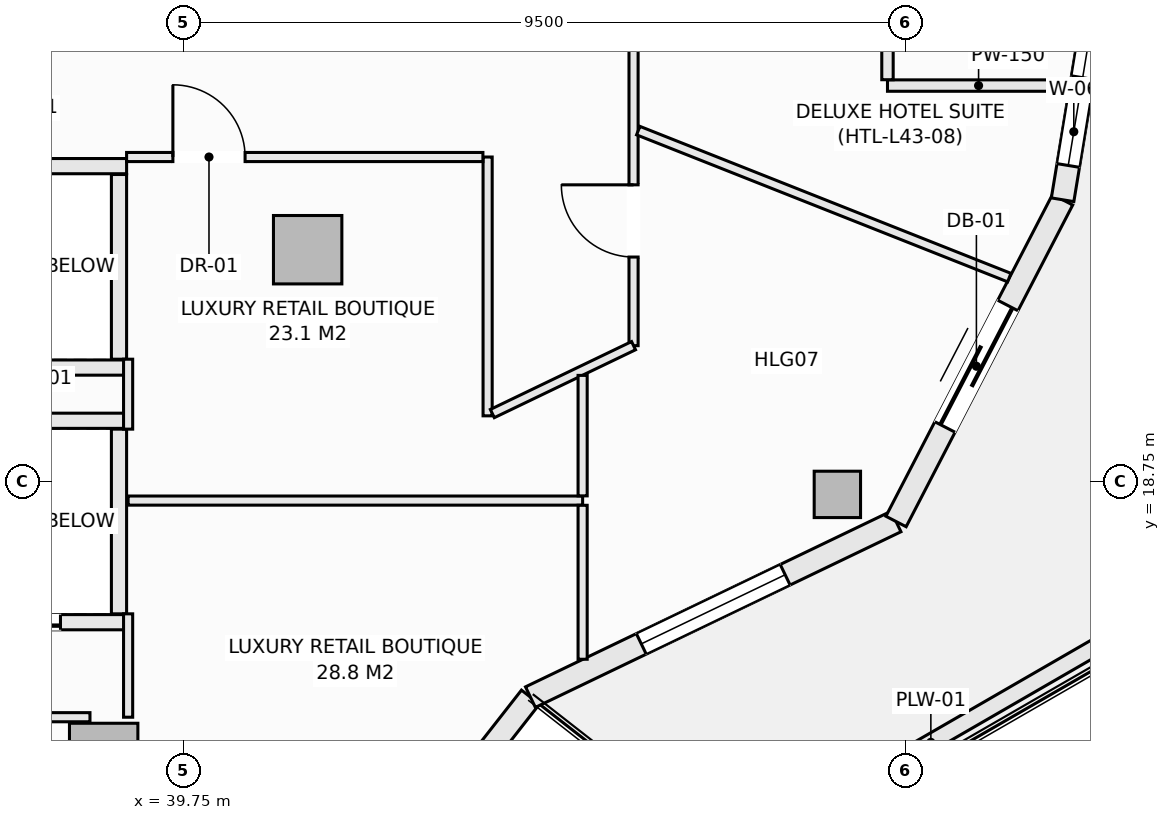
"""IFC4 building model, lengths in metres.
Left out: names, types, materials, properties, quantities, classifications, styles, units other than length and angle.
Written with IfcOpenShell. Run it as: python <this file> out.ifc"""

import sys

from ifc_helpers import new_model, si_unit, direction, frame, frame_2d, origin, origin_2d, place, context, subcontext, project, spatial, rectangle, hollow_rectangle, extrude, element, fill, save


model = new_model("IFC4")
c1 = context("Model", 3, precision=1e-05, world=origin(), true_north=direction((0.0, 1.0)))
c2 = subcontext(c1, "Body", "Model", "MODEL_VIEW")
j1 = project(units=[si_unit("LENGTHUNIT", "METRE"), si_unit("PLANEANGLEUNIT", "RADIAN")], contexts=[c1])
p1 = place(None, origin())
s1 = spatial("IfcSite", under=j1, at=p1, CompositionType="ELEMENT")
p2 = place(p1, origin())
s2 = spatial("IfcBuilding", under=s1, at=p2, CompositionType="ELEMENT")
p3 = place(p2, frame((0.0, 0.0, 166.5)))
s3 = spatial("IfcBuildingStorey", under=s2, at=p3, CompositionType="ELEMENT", Elevation=166.5)
p4 = place(p3, frame((48.352, 18.581, -0.27), z_axis=(0.0, 0.0, 1.0), x_axis=(1.0, 0.0, 0.0)))
e1 = element("IfcColumn", 1, at=p4, inside=s3, PredefinedType="COLUMN", context=c2, shape_type="SweptSolid", body=[
    extrude(hollow_rectangle(XDim=0.61, YDim=0.61, WallThickness=0.025, at=origin_2d()), origin(), (0.0, 0.0, 1.0), 3.4),
])
for number, where, z_axis, x_axis in (
    (2, (38.698, 15.121, -0.27), (0.0, 0.0, 1.0), (1.0, 0.0, 0.0)),
    (3, (41.382, 21.801, -0.27), (0.0, 0.0, 1.0), (1.0, 0.0, 0.0)),
):
    element("IfcColumn", number, at=place(p3, frame(where, z_axis=z_axis, x_axis=x_axis)), inside=s3, PredefinedType="COLUMN", context=c2, shape_type="SweptSolid", body=[
        extrude(rectangle(XDim=0.9, YDim=0.9, at=origin_2d()), origin(), (0.0, 0.0, 1.0), 3.4),
    ])
p5 = place(p3, frame((41.094, 11.801, 0.0), z_axis=(0.0, 0.0, 1.0), x_axis=(0.616429245738, 0.787410302828, 0.0)))
e4 = element("IfcWall", 4, at=p5, inside=s3, PredefinedType="SOLIDWALL", context=c2, shape_type="SweptSolid", body=[
    extrude(rectangle(XDim=5.223, YDim=0.3, at=frame_2d((2.612, 0.0))), origin(), (0.0, 0.0, 1.0), 2.653),
])
p6 = place(p5, frame((1.38, 0.0, 0.72)))
e5 = element("IfcOpeningElement", 5, at=p6, cuts=e4, PredefinedType="OPENING", context=c2, shape_type="SweptSolid", body=[
    extrude(rectangle(XDim=1.2, YDim=1.65, at=frame_2d((0.6, 0.825))), frame((0.0, 0.16, 0.0), z_axis=(0.0, -1.0, 0.0), x_axis=(1.0, 0.0, 0.0)), (0.0, 0.0, 1.0), 0.32),
])
p7 = place(p3, frame((44.313, 15.914, 0.0), z_axis=(0.0, 0.0, 1.0), x_axis=(0.901353070301, 0.433085029363, 0.0)))
e6 = element("IfcWall", 6, at=p7, inside=s3, PredefinedType="SOLIDWALL", context=c2, shape_type="SweptSolid", body=[
    extrude(rectangle(XDim=5.336, YDim=0.3, at=frame_2d((2.668, 0.0))), origin(), (0.0, 0.0, 1.0), 2.653),
])
p8 = place(p7, frame((1.618, 0.0, 0.74)))
e7 = element("IfcOpeningElement", 7, at=p8, cuts=e6, PredefinedType="OPENING", context=c2, shape_type="SweptSolid", body=[
    extrude(rectangle(XDim=2.1, YDim=1.7, at=frame_2d((1.05, 0.85))), frame((0.0, 0.16, 0.0), z_axis=(0.0, -1.0, 0.0), x_axis=(1.0, 0.0, 0.0)), (0.0, 0.0, 1.0), 0.32),
])
p9 = place(p3, frame((49.123, 18.225, 0.0), z_axis=(0.0, 0.0, 1.0), x_axis=(0.459810251451, 0.888017191647, 0.0)))
e8 = element("IfcWall", 8, at=p9, inside=s3, PredefinedType="SOLIDWALL", context=c2, shape_type="SweptSolid", body=[
    extrude(rectangle(XDim=4.766, YDim=0.3, at=frame_2d((2.383, 0.0))), origin(), (0.0, 0.0, 1.0), 2.653),
])
p10 = place(p9, frame((1.4, 0.0, 0.0)))
e9 = element("IfcOpeningElement", 9, at=p10, cuts=e8, PredefinedType="OPENING", context=c2, shape_type="SweptSolid", body=[
    extrude(rectangle(XDim=1.8, YDim=2.25, at=frame_2d((0.9, 1.125))), frame((0.0, 0.16, 0.0), z_axis=(0.0, -1.0, 0.0), x_axis=(1.0, 0.0, 0.0)), (0.0, 0.0, 1.0), 0.32),
])
p11 = place(p3, frame((51.315, 22.458, 0.0), z_axis=(0.0, 0.0, 1.0), x_axis=(0.162394765401, 0.986725868806, 0.0)))
e10 = element("IfcWall", 10, at=p11, inside=s3, PredefinedType="SOLIDWALL", context=c2, shape_type="SweptSolid", body=[
    extrude(rectangle(XDim=4.603, YDim=0.3, at=frame_2d((2.302, 0.0))), origin(), (0.0, 0.0, 1.0), 2.653),
])
p12 = place(p11, frame((0.457, 0.0, 0.72)))
e11 = element("IfcOpeningElement", 11, at=p12, cuts=e10, PredefinedType="OPENING", context=c2, shape_type="SweptSolid", body=[
    extrude(rectangle(XDim=0.9, YDim=1.65, at=frame_2d((0.45, 0.825))), frame((0.0, 0.16, 0.0), z_axis=(0.0, -1.0, 0.0), x_axis=(1.0, 0.0, 0.0)), (0.0, 0.0, 1.0), 0.32),
])
p13 = place(p11, frame((1.627, 0.0, 0.72)))
e12 = element("IfcOpeningElement", 12, at=p13, cuts=e10, PredefinedType="OPENING", context=c2, shape_type="SweptSolid", body=[
    extrude(rectangle(XDim=0.9, YDim=1.65, at=frame_2d((0.45, 0.825))), frame((0.0, 0.16, 0.0), z_axis=(0.0, -1.0, 0.0), x_axis=(1.0, 0.0, 0.0)), (0.0, 0.0, 1.0), 0.32),
])
p14 = place(p3, frame((46.958, 13.805, 0.0), z_axis=(0.0, 0.0, 1.0), x_axis=(0.866058128659, 0.499943314571, 0.0)))
e13 = element("IfcWall", 13, at=p14, inside=s3, PredefinedType="PARAPET", context=c2, shape_type="SweptSolid", body=[
    extrude(rectangle(XDim=6.06, YDim=0.22, at=frame_2d((3.03, 0.0))), origin(), (0.0, 0.0, 1.0), 0.52),
])
p15 = place(p3, frame((36.75, 19.55, 0.0), z_axis=(0.0, 0.0, 1.0), x_axis=(1.0, 0.0, 0.0)))
e14 = element("IfcWall", 14, at=p15, inside=s3, PredefinedType="SOLIDWALL", context=c2, shape_type="SweptSolid", body=[
    extrude(rectangle(XDim=2.25, YDim=0.2, at=frame_2d((1.125, 0.0))), origin(), (0.0, 0.0, 1.0), 3.13),
])
p16 = place(p3, frame((36.75, 16.9, 0.0), z_axis=(0.0, 0.0, 1.0), x_axis=(1.0, 0.0, 0.0)))
e15 = element("IfcWall", 15, at=p16, inside=s3, PredefinedType="SOLIDWALL", context=c2, shape_type="SweptSolid", body=[
    extrude(rectangle(XDim=2.25, YDim=0.2, at=frame_2d((1.125, 0.0))), origin(), (0.0, 0.0, 1.0), 3.13),
])
p17 = place(p16, frame((0.28, 0.0, 0.0)))
e16 = element("IfcOpeningElement", 16, at=p17, cuts=e15, PredefinedType="OPENING", context=c2, shape_type="SweptSolid", body=[
    extrude(rectangle(XDim=1.1, YDim=2.2, at=frame_2d((0.55, 1.1))), frame((0.0, 0.11, 0.0), z_axis=(0.0, -1.0, 0.0), x_axis=(1.0, 0.0, 0.0)), (0.0, 0.0, 1.0), 0.22),
])
p18 = place(p3, frame((38.9, 17.01, 0.0), z_axis=(0.0, 0.0, 1.0), x_axis=(0.0, 1.0, 0.0)))
e17 = element("IfcWall", 17, at=p18, inside=s3, PredefinedType="SOLIDWALL", context=c2, shape_type="SweptSolid", body=[
    extrude(rectangle(XDim=2.43, YDim=0.2, at=frame_2d((1.215, 0.0))), origin(), (0.0, 0.0, 1.0), 3.13),
])
for number, where, z_axis, x_axis in (
    (18, (36.75, 22.9, 0.0), (0.0, 0.0, 1.0), (1.0, 0.0, 0.0)),
    (19, (36.75, 20.25, 0.0), (0.0, 0.0, 1.0), (1.0, 0.0, 0.0)),
):
    element("IfcWall", number, at=place(p3, frame(where, z_axis=z_axis, x_axis=x_axis)), inside=s3, PredefinedType="SOLIDWALL", context=c2, shape_type="SweptSolid", body=[
        extrude(rectangle(XDim=2.25, YDim=0.2, at=frame_2d((1.125, 0.0))), origin(), (0.0, 0.0, 1.0), 3.13),
    ])
p19 = place(p3, frame((38.9, 20.36, 0.0), z_axis=(0.0, 0.0, 1.0), x_axis=(0.0, 1.0, 0.0)))
e20 = element("IfcWall", 20, at=p19, inside=s3, PredefinedType="SOLIDWALL", context=c2, shape_type="SweptSolid", body=[
    extrude(rectangle(XDim=2.43, YDim=0.2, at=frame_2d((1.215, 0.0))), origin(), (0.0, 0.0, 1.0), 3.13),
])
p20 = place(p3, frame((49.011, 23.96, 0.0), z_axis=(0.0, 0.0, 1.0), x_axis=(1.0, 0.0, 0.0)))
e21 = element("IfcWall", 21, at=p20, inside=s3, PredefinedType="PARTITIONING", context=c2, shape_type="SweptSolid", body=[
    extrude(rectangle(XDim=2.397, YDim=0.15, at=frame_2d((1.199, 0.0))), origin(), (0.0, 0.0, 1.0), 3.13),
])
p21 = place(p3, frame((39.02, 15.65, 0.0), z_axis=(0.0, 0.0, 1.0), x_axis=(0.0, 1.0, 0.0)))
e22 = element("IfcWall", 22, at=p21, inside=s3, PredefinedType="PARTITIONING", context=c2, shape_type="SweptSolid", body=[
    extrude(rectangle(XDim=1.36, YDim=0.12, at=frame_2d((0.68, 0.0))), origin(), (0.0, 0.0, 1.0), 2.505),
])
p22 = place(p3, frame((39.02, 19.44, 0.0), z_axis=(0.0, 0.0, 1.0), x_axis=(0.0, 1.0, 0.0)))
e23 = element("IfcWall", 23, at=p22, inside=s3, PredefinedType="PARTITIONING", context=c2, shape_type="SweptSolid", body=[
    extrude(rectangle(XDim=0.92, YDim=0.12, at=frame_2d((0.46, 0.0))), origin(), (0.0, 0.0, 1.0), 3.13),
])
p23 = place(p3, frame((35.95, 15.65, 0.0), z_axis=(0.0, 0.0, 1.0), x_axis=(1.0, 0.0, 0.0)))
e24 = element("IfcWall", 24, at=p23, inside=s3, PredefinedType="PARTITIONING", context=c2, shape_type="SweptSolid", body=[
    extrude(rectangle(XDim=2.568, YDim=0.12, at=frame_2d((1.284, 0.0))), origin(), (0.0, 0.0, 1.0), 3.13),
])
p24 = place(p23, frame((0.809, 0.0, 0.0)))
e25 = element("IfcOpeningElement", 25, at=p24, cuts=e24, PredefinedType="OPENING", context=c2, shape_type="SweptSolid", body=[
    extrude(rectangle(XDim=0.95, YDim=2.1, at=frame_2d((0.475, 1.05))), frame((0.0, 0.07, 0.0), z_axis=(0.0, -1.0, 0.0), x_axis=(1.0, 0.0, 0.0)), (0.0, 0.0, 1.0), 0.14),
])
p25 = place(p3, frame((43.75, 19.615, 0.0), z_axis=(0.0, 0.0, 1.0), x_axis=(0.0, 1.0, 0.0)))
e26 = element("IfcWall", 26, at=p25, inside=s3, PredefinedType="PARTITIONING", context=c2, shape_type="SweptSolid", body=[
    extrude(rectangle(XDim=3.405, YDim=0.12, at=frame_2d((1.703, 0.0))), origin(), (0.0, 0.0, 1.0), 3.13),
])
p26 = place(p3, frame((45.67, 20.538, 0.0), z_axis=(0.0, 0.0, 1.0), x_axis=(0.0, 1.0, 0.0)))
e27 = element("IfcWall", 27, at=p26, inside=s3, PredefinedType="PARTITIONING", context=c2, shape_type="SweptSolid", body=[
    extrude(rectangle(XDim=12.924, YDim=0.12, at=frame_2d((6.462, 0.0))), origin(), (0.0, 0.0, 1.0), 3.13),
])
p27 = place(p26, frame((1.166, 0.0, 0.0)))
e28 = element("IfcOpeningElement", 28, at=p27, cuts=e27, PredefinedType="OPENING", context=c2, shape_type="SweptSolid", body=[
    extrude(rectangle(XDim=0.95, YDim=2.1, at=frame_2d((0.475, 1.05))), frame((0.0, 0.07, 0.0), z_axis=(0.0, -1.0, 0.0), x_axis=(1.0, 0.0, 0.0)), (0.0, 0.0, 1.0), 0.14),
])
p28 = place(p26, frame((4.174, 0.0, 0.0)))
e29 = element("IfcOpeningElement", 29, at=p28, cuts=e27, PredefinedType="OPENING", context=c2, shape_type="SweptSolid", body=[
    extrude(rectangle(XDim=0.95, YDim=2.1, at=frame_2d((0.475, 1.05))), frame((0.0, 0.07, 0.0), z_axis=(0.0, -1.0, 0.0), x_axis=(1.0, 0.0, 0.0)), (0.0, 0.0, 1.0), 0.14),
])
p29 = place(p26, frame((7.8, 0.0, 0.0)))
e30 = element("IfcOpeningElement", 30, at=p29, cuts=e27, PredefinedType="OPENING", context=c2, shape_type="SweptSolid", body=[
    extrude(rectangle(XDim=0.95, YDim=2.1, at=frame_2d((0.475, 1.05))), frame((0.0, 0.07, 0.0), z_axis=(0.0, -1.0, 0.0), x_axis=(1.0, 0.0, 0.0)), (0.0, 0.0, 1.0), 0.14),
])
p30 = place(p26, frame((10.808, 0.0, 0.0)))
e31 = element("IfcOpeningElement", 31, at=p30, cuts=e27, PredefinedType="OPENING", context=c2, shape_type="SweptSolid", body=[
    extrude(rectangle(XDim=0.95, YDim=2.1, at=frame_2d((0.475, 1.05))), frame((0.0, 0.07, 0.0), z_axis=(0.0, -1.0, 0.0), x_axis=(1.0, 0.0, 0.0)), (0.0, 0.0, 1.0), 0.14),
])
p31 = place(p3, frame((43.812, 19.645, 0.0), z_axis=(0.0, 0.0, 1.0), x_axis=(0.901236415331, 0.433327732417, 0.0)))
e32 = element("IfcWall", 32, at=p31, inside=s3, PredefinedType="PARTITIONING", context=c2, shape_type="SweptSolid", body=[
    extrude(rectangle(XDim=2.062, YDim=0.12, at=frame_2d((1.031, 0.0))), origin(), (0.0, 0.0, 1.0), 3.13),
])
p32 = place(p3, frame((39.0, 23.02, 0.0), z_axis=(0.0, 0.0, 1.0), x_axis=(1.0, 0.0, 0.0)))
e33 = element("IfcWall", 33, at=p32, inside=s3, PredefinedType="PARTITIONING", context=c2, shape_type="SweptSolid", body=[
    extrude(rectangle(XDim=4.688, YDim=0.12, at=frame_2d((2.344, 0.0))), origin(), (0.0, 0.0, 1.0), 3.13),
])
p33 = place(p32, frame((0.609, 0.0, 0.0)))
e34 = element("IfcOpeningElement", 34, at=p33, cuts=e33, PredefinedType="OPENING", context=c2, shape_type="SweptSolid", body=[
    extrude(rectangle(XDim=0.95, YDim=2.1, at=frame_2d((0.475, 1.05))), frame((0.0, 0.07, 0.0), z_axis=(0.0, -1.0, 0.0), x_axis=(1.0, 0.0, 0.0)), (0.0, 0.0, 1.0), 0.14),
])
p34 = place(p3, frame((39.02, 18.5, 0.0), z_axis=(0.0, 0.0, 1.0), x_axis=(1.0, 0.0, 0.0)))
e35 = element("IfcWall", 35, at=p34, inside=s3, PredefinedType="PARTITIONING", context=c2, shape_type="SweptSolid", body=[
    extrude(rectangle(XDim=5.98, YDim=0.12, at=frame_2d((2.99, 0.0))), origin(), (0.0, 0.0, 1.0), 2.812),
])
p35 = place(p3, frame((45.0, 16.413, 0.0), z_axis=(0.0, 0.0, 1.0), x_axis=(0.0, 1.0, 0.0)))
e36 = element("IfcWall", 36, at=p35, inside=s3, PredefinedType="PARTITIONING", context=c2, shape_type="SweptSolid", body=[
    extrude(rectangle(XDim=2.025, YDim=0.12, at=frame_2d((1.013, 0.0))), origin(), (0.0, 0.0, 1.0), 3.13),
])
p36 = place(p3, frame((45.0, 18.562, 0.0), z_axis=(0.0, 0.0, 1.0), x_axis=(0.0, 1.0, 0.0)))
e37 = element("IfcWall", 37, at=p36, inside=s3, PredefinedType="PARTITIONING", context=c2, shape_type="SweptSolid", body=[
    extrude(rectangle(XDim=1.585, YDim=0.12, at=frame_2d((0.792, 0.0))), origin(), (0.0, 0.0, 1.0), 3.13),
])
p37 = place(p3, frame((45.732, 23.367, 0.0), z_axis=(0.0, 0.0, 1.0), x_axis=(0.929706134606, -0.368302190158, 0.0)))
e38 = element("IfcWall", 38, at=p37, inside=s3, PredefinedType="PARTITIONING", context=c2, shape_type="SweptSolid", body=[
    extrude(rectangle(XDim=5.251, YDim=0.12, at=frame_2d((2.625, 0.0))), origin(), (0.0, 0.0, 1.0), 3.13),
])
p38 = place(p3, frame((49.011, 24.037, 0.0), z_axis=(0.0, 0.0, 1.0), x_axis=(0.0, 1.0, 0.0)))
e39 = element("IfcWall", 39, at=p38, inside=s3, PredefinedType="PARTITIONING", context=c2, shape_type="SweptSolid", body=[
    extrude(rectangle(XDim=2.436, YDim=0.15, at=frame_2d((1.218, 0.0))), origin(), (0.0, 0.0, 1.0), 3.13),
])
p39 = place(p38, frame((0.768, 0.0, 0.0)))
e40 = element("IfcOpeningElement", 40, at=p39, cuts=e39, PredefinedType="OPENING", context=c2, shape_type="SweptSolid", body=[
    extrude(rectangle(XDim=0.9, YDim=2.1, at=frame_2d((0.45, 1.05))), frame((0.0, 0.085, 0.0), z_axis=(0.0, -1.0, 0.0), x_axis=(1.0, 0.0, 0.0)), (0.0, 0.0, 1.0), 0.17),
])
p40 = place(p8, origin())
e41 = element("IfcWindow", 41, at=p40, inside=s3, PartitioningType="SINGLE_PANEL", PredefinedType="WINDOW", context=c2, shape_type="SweptSolid", body=[
    extrude(rectangle(XDim=2.1, YDim=1.7, at=frame_2d((1.05, 0.85))), frame((0.0, 0.03, 0.0), z_axis=(0.0, -1.0, 0.0), x_axis=(1.0, 0.0, 0.0)), (0.0, 0.0, 1.0), 0.06),
])
fill(e7, e41)
p41 = place(p10, frame((1.8, 0.0, 0.0), z_axis=(0.0, 0.0, 1.0), x_axis=(-1.0, 0.0, 0.0)))
e42 = element("IfcDoor", 42, at=p41, inside=s3, OperationType="SLIDING_TO_LEFT", PredefinedType="DOOR", context=c2, shape_type="SweptSolid", body=[
    extrude(rectangle(XDim=1.8, YDim=2.25, at=frame_2d((0.9, 1.125))), frame((0.0, 0.025, 0.0), z_axis=(0.0, -1.0, 0.0), x_axis=(1.0, 0.0, 0.0)), (0.0, 0.0, 1.0), 0.05),
])
fill(e9, e42)
p42 = place(p12, origin())
e43 = element("IfcWindow", 43, at=p42, inside=s3, PartitioningType="SINGLE_PANEL", PredefinedType="WINDOW", context=c2, shape_type="SweptSolid", body=[
    extrude(rectangle(XDim=0.9, YDim=1.65, at=frame_2d((0.45, 0.825))), frame((0.0, 0.03, 0.0), z_axis=(0.0, -1.0, 0.0), x_axis=(1.0, 0.0, 0.0)), (0.0, 0.0, 1.0), 0.06),
])
fill(e11, e43)
p43 = place(p17, origin())
e44 = element("IfcDoor", 44, at=p43, inside=s3, OperationType="SLIDING_TO_LEFT", PredefinedType="DOOR", context=c2, shape_type="SweptSolid", body=[
    extrude(rectangle(XDim=1.1, YDim=2.2, at=frame_2d((0.55, 1.1))), frame((0.0, 0.025, 0.0), z_axis=(0.0, -1.0, 0.0), x_axis=(1.0, 0.0, 0.0)), (0.0, 0.0, 1.0), 0.05),
])
fill(e16, e44)
p44 = place(p33, origin())
e45 = element("IfcDoor", 45, at=p44, inside=s3, OperationType="SINGLE_SWING_LEFT", PredefinedType="DOOR", context=c2, shape_type="SweptSolid", body=[
    extrude(rectangle(XDim=0.95, YDim=2.1, at=frame_2d((0.475, 1.05))), frame((0.0, 0.025, 0.0), z_axis=(0.0, -1.0, 0.0), x_axis=(1.0, 0.0, 0.0)), (0.0, 0.0, 1.0), 0.05),
])
fill(e34, e45)
p45 = place(p27, origin())
e46 = element("IfcDoor", 46, at=p45, inside=s3, OperationType="SINGLE_SWING_RIGHT", PredefinedType="DOOR", context=c2, shape_type="SweptSolid", body=[
    extrude(rectangle(XDim=0.95, YDim=2.1, at=frame_2d((0.475, 1.05))), frame((0.0, 0.025, 0.0), z_axis=(0.0, -1.0, 0.0), x_axis=(1.0, 0.0, 0.0)), (0.0, 0.0, 1.0), 0.05),
])
fill(e28, e46)
p46 = place(p13, origin())
e47 = element("IfcWindow", 47, at=p46, inside=s3, PartitioningType="SINGLE_PANEL", PredefinedType="WINDOW", context=c2, shape_type="SweptSolid", body=[
    extrude(rectangle(XDim=0.9, YDim=1.65, at=frame_2d((0.45, 0.825))), frame((0.0, 0.03, 0.0), z_axis=(0.0, -1.0, 0.0), x_axis=(1.0, 0.0, 0.0)), (0.0, 0.0, 1.0), 0.06),
])
fill(e12, e47)
save(model, sys.argv[1])
